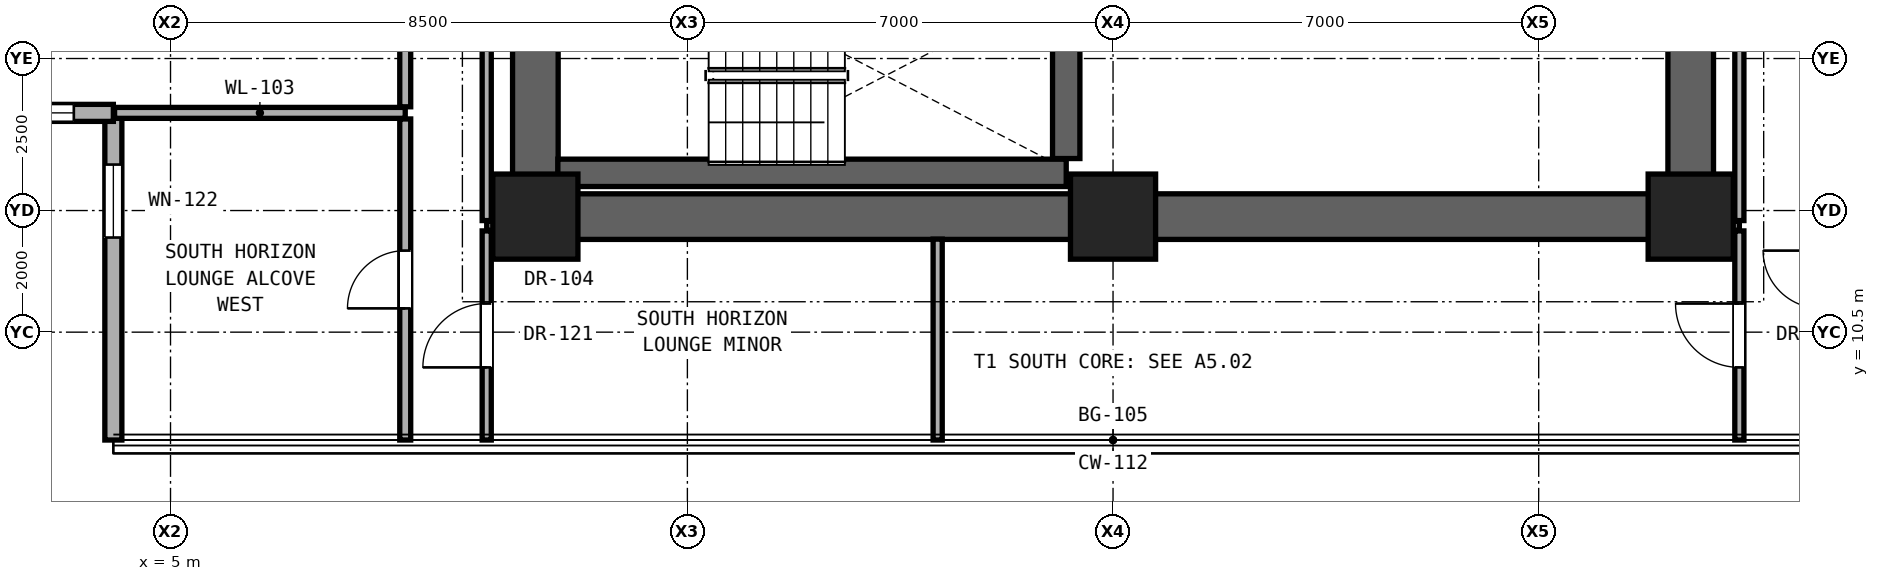
"""IFC4 building model, lengths in metres.
Left out: names, types, materials, properties, quantities, classifications, styles, units other than length and angle.
Written with IfcOpenShell. Run it as: python <this file> out.ifc"""

import sys

from ifc_helpers import new_model, si_unit, direction, frame, frame_2d, origin, origin_2d, place, context, subcontext, project, spatial, rectangle, extrude, element, fill, save


model = new_model("IFC4")
c1 = context("Model", 3, precision=1e-05, world=origin(), true_north=direction((0.0, 1.0)))
c2 = subcontext(c1, "Body", "Model", "MODEL_VIEW")
j1 = project(units=[si_unit("LENGTHUNIT", "METRE"), si_unit("PLANEANGLEUNIT", "RADIAN")], contexts=[c1])
p1 = place(None, origin())
s1 = spatial("IfcSite", under=j1, at=p1, CompositionType="ELEMENT")
p2 = place(p1, origin())
s2 = spatial("IfcBuilding", under=s1, at=p2, CompositionType="ELEMENT")
p3 = place(p2, frame((0.0, 0.0, 32.3)))
s3 = spatial("IfcBuildingStorey", under=s2, at=p3, CompositionType="ELEMENT", Elevation=32.3)
for number, where, z_axis, x_axis in (
    (1, (11.0, 12.4, 0.0), (0.0, 0.0, 1.0), (1.0, 0.0, 0.0)),
    (2, (20.5, 12.4, 0.0), (0.0, 0.0, 1.0), (1.0, 0.0, 0.0)),
    (3, (30.0, 12.4, 0.0), (0.0, 0.0, 1.0), (1.0, 0.0, 0.0)),
):
    element("IfcColumn", number, at=place(p3, frame(where, z_axis=z_axis, x_axis=x_axis)), inside=s3, PredefinedType="COLUMN", context=c2, shape_type="SweptSolid", body=[
        extrude(rectangle(XDim=1.4, YDim=1.4, at=origin_2d()), origin(), (0.0, 0.0, 1.0), 3.3),
    ])
p4 = place(p3, frame((11.0, 12.4, 0.0), z_axis=(0.0, 0.0, 1.0), x_axis=(1.0, 0.0, 0.0)))
e4 = element("IfcWall", 4, at=p4, inside=s3, PredefinedType="SHEAR", context=c2, shape_type="SweptSolid", body=[
    extrude(rectangle(XDim=19.0, YDim=0.75, at=frame_2d((9.5, 0.0))), origin(), (0.0, 0.0, 1.0), 3.06),
])
for number, where, z_axis, x_axis in (
    (5, (11.0, 12.4, 0.0), (0.0, 0.0, 1.0), (0.0, 1.0, 0.0)),
    (6, (30.0, 12.4, 0.0), (0.0, 0.0, 1.0), (0.0, 1.0, 0.0)),
):
    element("IfcWall", number, at=place(p3, frame(where, z_axis=z_axis, x_axis=x_axis)), inside=s3, PredefinedType="SHEAR", context=c2, shape_type="SweptSolid", body=[
        extrude(rectangle(XDim=6.0, YDim=0.75, at=frame_2d((3.0, 0.0))), origin(), (0.0, 0.0, 1.0), 3.06),
    ])
p5 = place(p3, frame((4.06, 14.106, 0.0), z_axis=(0.0, 0.0, 1.0), x_axis=(0.0, -1.0, 0.0)))
e7 = element("IfcWall", 7, at=p5, inside=s3, PredefinedType="SOLIDWALL", context=c2, shape_type="SweptSolid", body=[
    extrude(rectangle(XDim=5.38, YDim=0.28, at=frame_2d((2.69, 0.0))), origin(), (0.0, 0.0, 1.0), 3.04),
])
p6 = place(p5, frame((0.85, 0.0, 0.79)))
e8 = element("IfcOpeningElement", 8, at=p6, cuts=e7, PredefinedType="OPENING", context=c2, shape_type="SweptSolid", body=[
    extrude(rectangle(XDim=1.2, YDim=2.1, at=frame_2d((0.6, 1.05))), frame((0.0, 0.15, 0.0), z_axis=(0.0, -1.0, 0.0), x_axis=(1.0, 0.0, 0.0)), (0.0, 0.0, 1.0), 0.3),
])
p7 = place(p3, frame((-1.32, 14.106, 0.0), z_axis=(0.0, 0.0, 1.0), x_axis=(1.0, 0.0, 0.0)))
e9 = element("IfcWall", 9, at=p7, inside=s3, PredefinedType="SOLIDWALL", context=c2, shape_type="SweptSolid", body=[
    extrude(rectangle(XDim=5.38, YDim=0.28, at=frame_2d((2.69, 0.0))), origin(), (0.0, 0.0, 1.0), 3.04),
])
p8 = place(p7, frame((3.63, 0.0, 0.85)))
e10 = element("IfcOpeningElement", 10, at=p8, cuts=e9, PredefinedType="OPENING", context=c2, shape_type="SweptSolid", body=[
    extrude(rectangle(XDim=1.1, YDim=2.0, at=frame_2d((0.55, 1.0))), frame((0.0, 0.15, 0.0), z_axis=(0.0, -1.0, 0.0), x_axis=(1.0, 0.0, 0.0)), (0.0, 0.0, 1.0), 0.3),
])
for number, where, z_axis, x_axis in (
    (11, (10.2, 12.25, 0.0), (0.0, 0.0, 1.0), (1.0, 0.0, 0.0)),
    (12, (30.37, 12.25, 0.0), (0.0, 0.0, 1.0), (1.0, 0.0, 0.0)),
):
    element("IfcWall", number, at=place(p3, frame(where, z_axis=z_axis, x_axis=x_axis)), inside=s3, PredefinedType="PARTITIONING", context=c2, shape_type="SweptSolid", body=[
        extrude(rectangle(XDim=0.43, YDim=0.15, at=frame_2d((0.215, 0.0))), origin(), (0.0, 0.0, 1.0), 3.06),
    ])
p9 = place(p3, frame((11.37, 13.12, 0.0), z_axis=(0.0, 0.0, 1.0), x_axis=(1.0, 0.0, 0.0)))
e13 = element("IfcWall", 13, at=p9, inside=s3, PredefinedType="SHEAR", context=c2, shape_type="SweptSolid", body=[
    extrude(rectangle(XDim=8.36, YDim=0.45, at=frame_2d((4.18, 0.0))), origin(), (0.0, 0.0, 1.0), 3.06),
])
p10 = place(p3, frame((4.08, 14.106, 0.0), z_axis=(0.0, 0.0, 1.0), x_axis=(1.0, 0.0, 0.0)))
e14 = element("IfcWall", 14, at=p10, inside=s3, PredefinedType="PARTITIONING", context=c2, shape_type="SweptSolid", body=[
    extrude(rectangle(XDim=4.78, YDim=0.18, at=frame_2d((2.39, 0.0))), origin(), (0.0, 0.0, 1.0), 3.06),
])
p11 = place(p3, frame((8.86, 8.726, 0.0), z_axis=(0.0, 0.0, 1.0), x_axis=(0.0, 1.0, 0.0)))
e15 = element("IfcWall", 15, at=p11, inside=s3, PredefinedType="PARTITIONING", context=c2, shape_type="SweptSolid", body=[
    extrude(rectangle(XDim=5.28, YDim=0.18, at=frame_2d((2.64, 0.0))), origin(), (0.0, 0.0, 1.0), 3.06),
])
p12 = place(p11, frame((2.165, 0.0, 0.0)))
e16 = element("IfcOpeningElement", 16, at=p12, cuts=e15, PredefinedType="OPENING", context=c2, shape_type="SweptSolid", body=[
    extrude(rectangle(XDim=0.95, YDim=2.15, at=frame_2d((0.475, 1.075))), frame((0.0, 0.1, 0.0), z_axis=(0.0, -1.0, 0.0), x_axis=(1.0, 0.0, 0.0)), (0.0, 0.0, 1.0), 0.2),
])
p13 = place(p3, frame((8.86, 14.206, 0.0), z_axis=(0.0, 0.0, 1.0), x_axis=(0.0, 1.0, 0.0)))
e17 = element("IfcWall", 17, at=p13, inside=s3, PredefinedType="PARTITIONING", context=c2, shape_type="SweptSolid", body=[
    extrude(rectangle(XDim=8.194, YDim=0.18, at=frame_2d((4.097, 0.0))), origin(), (0.0, 0.0, 1.0), 2.436),
])
p14 = place(p13, frame((3.572, 0.0, 0.0)))
e18 = element("IfcOpeningElement", 18, at=p14, cuts=e17, PredefinedType="OPENING", context=c2, shape_type="SweptSolid", body=[
    extrude(rectangle(XDim=1.05, YDim=2.2, at=frame_2d((0.525, 1.1))), frame((0.0, 0.1, 0.0), z_axis=(0.0, -1.0, 0.0), x_axis=(1.0, 0.0, 0.0)), (0.0, 0.0, 1.0), 0.2),
])
p15 = place(p3, frame((10.2, 8.726, 0.0), z_axis=(0.0, 0.0, 1.0), x_axis=(0.0, 1.0, 0.0)))
e19 = element("IfcWall", 19, at=p15, inside=s3, PredefinedType="PARTITIONING", context=c2, shape_type="SweptSolid", body=[
    extrude(rectangle(XDim=3.439, YDim=0.15, at=frame_2d((1.719, 0.0))), origin(), (0.0, 0.0, 1.0), 3.06),
])
p16 = place(p15, frame((1.195, 0.0, 0.0)))
e20 = element("IfcOpeningElement", 20, at=p16, cuts=e19, PredefinedType="OPENING", context=c2, shape_type="SweptSolid", body=[
    extrude(rectangle(XDim=1.05, YDim=2.2, at=frame_2d((0.525, 1.1))), frame((0.0, 0.085, 0.0), z_axis=(0.0, -1.0, 0.0), x_axis=(1.0, 0.0, 0.0)), (0.0, 0.0, 1.0), 0.17),
])
p17 = place(p3, frame((10.2, 12.335, 0.0), z_axis=(0.0, 0.0, 1.0), x_axis=(0.0, 1.0, 0.0)))
e21 = element("IfcWall", 21, at=p17, inside=s3, PredefinedType="PARTITIONING", context=c2, shape_type="SweptSolid", body=[
    extrude(rectangle(XDim=5.98, YDim=0.15, at=frame_2d((2.99, 0.0))), origin(), (0.0, 0.0, 1.0), 2.436),
])
p18 = place(p3, frame((17.616, 8.726, 0.0), z_axis=(0.0, 0.0, 1.0), x_axis=(0.0, 1.0, 0.0)))
e22 = element("IfcWall", 22, at=p18, inside=s3, PredefinedType="PARTITIONING", context=c2, shape_type="SweptSolid", body=[
    extrude(rectangle(XDim=3.304, YDim=0.15, at=frame_2d((1.652, 0.0))), origin(), (0.0, 0.0, 1.0), 3.06),
])
p19 = place(p3, frame((19.73, 13.355, 0.0), z_axis=(0.0, 0.0, 1.0), x_axis=(0.0, 1.0, 0.0)))
e23 = element("IfcWall", 23, at=p19, inside=s3, PredefinedType="SHEAR", context=c2, shape_type="SweptSolid", body=[
    extrude(rectangle(XDim=2.73, YDim=0.45, at=frame_2d((1.365, 0.0))), origin(), (0.0, 0.0, 1.0), 3.06),
])
p20 = place(p3, frame((30.8, 8.726, 0.0), z_axis=(0.0, 0.0, 1.0), x_axis=(0.0, 1.0, 0.0)))
e24 = element("IfcWall", 24, at=p20, inside=s3, PredefinedType="PARTITIONING", context=c2, shape_type="SweptSolid", body=[
    extrude(rectangle(XDim=3.439, YDim=0.15, at=frame_2d((1.719, 0.0))), origin(), (0.0, 0.0, 1.0), 3.06),
])
p21 = place(p20, frame((1.195, 0.0, 0.0)))
e25 = element("IfcOpeningElement", 25, at=p21, cuts=e24, PredefinedType="OPENING", context=c2, shape_type="SweptSolid", body=[
    extrude(rectangle(XDim=1.05, YDim=2.2, at=frame_2d((0.525, 1.1))), frame((0.0, 0.085, 0.0), z_axis=(0.0, -1.0, 0.0), x_axis=(1.0, 0.0, 0.0)), (0.0, 0.0, 1.0), 0.17),
])
p22 = place(p3, frame((30.8, 12.335, 0.0), z_axis=(0.0, 0.0, 1.0), x_axis=(0.0, 1.0, 0.0)))
e26 = element("IfcWall", 26, at=p22, inside=s3, PredefinedType="PARTITIONING", context=c2, shape_type="SweptSolid", body=[
    extrude(rectangle(XDim=5.98, YDim=0.15, at=frame_2d((2.99, 0.0))), origin(), (0.0, 0.0, 1.0), 2.436),
])
p23 = place(p6, origin())
e27 = element("IfcWindow", 27, at=p23, inside=s3, PartitioningType="SINGLE_PANEL", PredefinedType="WINDOW", context=c2, shape_type="SweptSolid", body=[
    extrude(rectangle(XDim=1.2, YDim=2.1, at=frame_2d((0.6, 1.05))), frame((0.0, 0.03, 0.0), z_axis=(0.0, -1.0, 0.0), x_axis=(1.0, 0.0, 0.0)), (0.0, 0.0, 1.0), 0.06),
])
fill(e8, e27)
p24 = place(p8, origin())
e28 = element("IfcWindow", 28, at=p24, inside=s3, PartitioningType="SINGLE_PANEL", PredefinedType="WINDOW", context=c2, shape_type="SweptSolid", body=[
    extrude(rectangle(XDim=1.1, YDim=2.0, at=frame_2d((0.55, 1.0))), frame((0.0, 0.03, 0.0), z_axis=(0.0, -1.0, 0.0), x_axis=(1.0, 0.0, 0.0)), (0.0, 0.0, 1.0), 0.06),
])
fill(e10, e28)
p25 = place(p16, origin())
e29 = element("IfcDoor", 29, at=p25, inside=s3, OperationType="SINGLE_SWING_LEFT", PredefinedType="DOOR", context=c2, shape_type="SweptSolid", body=[
    extrude(rectangle(XDim=1.05, YDim=2.2, at=frame_2d((0.525, 1.1))), frame((0.0, 0.025, 0.0), z_axis=(0.0, -1.0, 0.0), x_axis=(1.0, 0.0, 0.0)), (0.0, 0.0, 1.0), 0.05),
])
fill(e20, e29)
p26 = place(p21, origin())
e30 = element("IfcDoor", 30, at=p26, inside=s3, OperationType="SINGLE_SWING_RIGHT", PredefinedType="DOOR", context=c2, shape_type="SweptSolid", body=[
    extrude(rectangle(XDim=1.05, YDim=2.2, at=frame_2d((0.525, 1.1))), frame((0.0, 0.025, 0.0), z_axis=(0.0, -1.0, 0.0), x_axis=(1.0, 0.0, 0.0)), (0.0, 0.0, 1.0), 0.05),
])
fill(e25, e30)
p27 = place(p12, origin())
e31 = element("IfcDoor", 31, at=p27, inside=s3, OperationType="SINGLE_SWING_LEFT", PredefinedType="DOOR", context=c2, shape_type="SweptSolid", body=[
    extrude(rectangle(XDim=0.95, YDim=2.15, at=frame_2d((0.475, 1.075))), frame((0.0, 0.025, 0.0), z_axis=(0.0, -1.0, 0.0), x_axis=(1.0, 0.0, 0.0)), (0.0, 0.0, 1.0), 0.05),
])
fill(e16, e31)
save(model, sys.argv[1])
